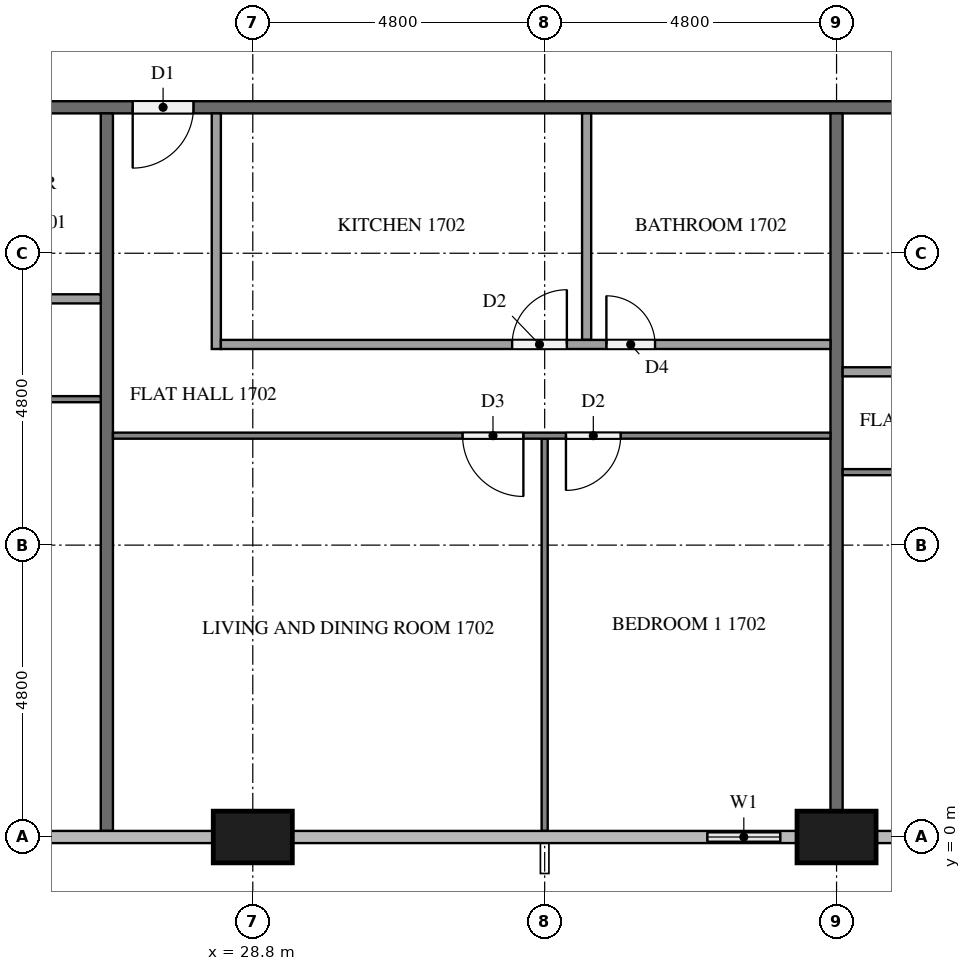
"""IFC4 building model, lengths in metres.
Left out: names, types, materials, properties, quantities, classifications, styles, units other than length and angle.
Written with IfcOpenShell. Run it as: python <this file> out.ifc"""

import sys

from ifc_helpers import new_model, si_unit, direction, frame, frame_2d, origin, origin_2d, place, context, subcontext, project, spatial, rectangle, extrude, element, fill, save


model = new_model("IFC4")
c1 = context("Model", 3, precision=1e-05, world=origin(), true_north=direction((0.0, 1.0)))
c2 = subcontext(c1, "Body", "Model", "MODEL_VIEW")
j1 = project(units=[si_unit("LENGTHUNIT", "METRE"), si_unit("PLANEANGLEUNIT", "RADIAN")], contexts=[c1])
p1 = place(None, origin())
s1 = spatial("IfcSite", under=j1, at=p1, CompositionType="ELEMENT")
p2 = place(p1, origin())
s2 = spatial("IfcBuilding", under=s1, at=p2, CompositionType="ELEMENT")
p3 = place(p2, frame((0.0, 0.0, 69.8)))
s3 = spatial("IfcBuildingStorey", under=s2, at=p3, CompositionType="ELEMENT", Elevation=69.8)
for number, where, z_axis, x_axis in (
    (1, (28.8, 0.0, 0.0), (0.0, 0.0, 1.0), (1.0, 0.0, 0.0)),
    (2, (38.4, 0.0, 0.0), (0.0, 0.0, 1.0), (1.0, 0.0, 0.0)),
):
    element("IfcColumn", number, at=place(p3, frame(where, z_axis=z_axis, x_axis=x_axis)), inside=s3, PredefinedType="COLUMN", context=c2, shape_type="SweptSolid", body=[
        extrude(rectangle(XDim=1.3, YDim=0.85, at=origin_2d()), origin(), (0.0, 0.0, 1.0), 3.2),
    ])
p4 = place(p3, frame((36.0, 0.0, 0.0), z_axis=(0.0, 0.0, 1.0), x_axis=(1.0, 0.0, 0.0)))
e3 = element("IfcWall", 3, at=p4, inside=s3, PredefinedType="SOLIDWALL", context=c2, shape_type="SweptSolid", body=[
    extrude(rectangle(XDim=1.75, YDim=0.15, at=frame_2d((0.875, 0.0))), origin(), (0.0, 0.0, 1.0), 3.2),
])
p5 = place(p4, frame((0.275, 0.0, 0.9)))
e4 = element("IfcOpeningElement", 4, at=p5, cuts=e3, PredefinedType="OPENING", context=c2, shape_type="SweptSolid", body=[
    extrude(rectangle(XDim=1.2, YDim=1.4, at=frame_2d((0.6, 0.7))), frame((0.0, 0.085, 0.0), z_axis=(0.0, -1.0, 0.0), x_axis=(1.0, 0.0, 0.0)), (0.0, 0.0, 1.0), 0.17),
])
p6 = place(p3, frame((39.05, 0.0, 0.0), z_axis=(0.0, 0.0, 1.0), x_axis=(1.0, 0.0, 0.0)))
e5 = element("IfcWall", 5, at=p6, inside=s3, PredefinedType="SOLIDWALL", context=c2, shape_type="SweptSolid", body=[
    extrude(rectangle(XDim=1.75, YDim=0.15, at=frame_2d((0.875, 0.0))), origin(), (0.0, 0.0, 1.0), 3.2),
])
p7 = place(p6, frame((0.275, 0.0, 0.9)))
e6 = element("IfcOpeningElement", 6, at=p7, cuts=e5, PredefinedType="OPENING", context=c2, shape_type="SweptSolid", body=[
    extrude(rectangle(XDim=1.2, YDim=1.4, at=frame_2d((0.6, 0.7))), frame((0.0, 0.085, 0.0), z_axis=(0.0, -1.0, 0.0), x_axis=(1.0, 0.0, 0.0)), (0.0, 0.0, 1.0), 0.17),
])
p8 = place(p3, frame((50.5, 12.0, 0.0), z_axis=(0.0, 0.0, 1.0), x_axis=(-1.0, 0.0, 0.0)))
e7 = element("IfcWall", 7, at=p8, inside=s3, PredefinedType="PARTITIONING", context=c2, shape_type="SweptSolid", body=[
    extrude(rectangle(XDim=38.6, YDim=0.2, at=frame_2d((19.3, 0.0))), origin(), (0.0, 0.0, 1.0), 3.2),
])
p9 = place(p8, frame((37.075, 0.0, 0.0)))
e8 = element("IfcOpeningElement", 8, at=p9, cuts=e7, PredefinedType="OPENING", context=c2, shape_type="SweptSolid", body=[
    extrude(rectangle(XDim=1.0, YDim=2.1, at=frame_2d((0.5, 1.05))), frame((0.0, 0.11, 0.0), z_axis=(0.0, -1.0, 0.0), x_axis=(1.0, 0.0, 0.0)), (0.0, 0.0, 1.0), 0.22),
])
p10 = place(p8, frame((22.675, 0.0, 0.0)))
e9 = element("IfcOpeningElement", 9, at=p10, cuts=e7, PredefinedType="OPENING", context=c2, shape_type="SweptSolid", body=[
    extrude(rectangle(XDim=1.0, YDim=2.1, at=frame_2d((0.5, 1.05))), frame((0.0, 0.11, 0.0), z_axis=(0.0, -1.0, 0.0), x_axis=(1.0, 0.0, 0.0)), (0.0, 0.0, 1.0), 0.22),
])
p11 = place(p8, frame((0.525, 0.0, 0.0)))
e10 = element("IfcOpeningElement", 10, at=p11, cuts=e7, PredefinedType="OPENING", context=c2, shape_type="SweptSolid", body=[
    extrude(rectangle(XDim=1.0, YDim=2.1, at=frame_2d((0.5, 1.05))), frame((0.0, 0.11, 0.0), z_axis=(0.0, -1.0, 0.0), x_axis=(1.0, 0.0, 0.0)), (0.0, 0.0, 1.0), 0.22),
])
p12 = place(p3, frame((26.4, 11.9, 0.0), z_axis=(0.0, 0.0, 1.0), x_axis=(0.0, -1.0, 0.0)))
e11 = element("IfcWall", 11, at=p12, inside=s3, PredefinedType="PARTITIONING", context=c2, shape_type="SweptSolid", body=[
    extrude(rectangle(XDim=11.8, YDim=0.2, at=frame_2d((5.9, 0.0))), origin(), (0.0, 0.0, 1.0), 3.2),
])
p13 = place(p3, frame((38.4, 11.9, 0.0), z_axis=(0.0, 0.0, 1.0), x_axis=(0.0, -1.0, 0.0)))
e12 = element("IfcWall", 12, at=p13, inside=s3, PredefinedType="PARTITIONING", context=c2, shape_type="SweptSolid", body=[
    extrude(rectangle(XDim=11.475, YDim=0.2, at=frame_2d((5.737, 0.0))), origin(), (0.0, 0.0, 1.0), 3.2),
])
p14 = place(p3, frame((26.3, 7.2, 0.0), z_axis=(0.0, 0.0, 1.0), x_axis=(-1.0, 0.0, 0.0)))
e13 = element("IfcWall", 13, at=p14, inside=s3, PredefinedType="PARTITIONING", context=c2, shape_type="SweptSolid", body=[
    extrude(rectangle(XDim=14.2, YDim=0.1, at=frame_2d((7.1, 0.0))), origin(), (0.0, 0.0, 1.0), 3.2),
])
p15 = place(p14, frame((12.9, 0.0, 0.0)))
e14 = element("IfcOpeningElement", 14, at=p15, cuts=e13, PredefinedType="OPENING", context=c2, shape_type="SweptSolid", body=[
    extrude(rectangle(XDim=1.0, YDim=2.1, at=frame_2d((0.5, 1.05))), frame((0.0, 0.06, 0.0), z_axis=(0.0, -1.0, 0.0), x_axis=(1.0, 0.0, 0.0)), (0.0, 0.0, 1.0), 0.12),
])
p16 = place(p14, frame((5.05, 0.0, 0.0)))
e15 = element("IfcOpeningElement", 15, at=p16, cuts=e13, PredefinedType="OPENING", context=c2, shape_type="SweptSolid", body=[
    extrude(rectangle(XDim=0.9, YDim=2.1, at=frame_2d((0.45, 1.05))), frame((0.0, 0.06, 0.0), z_axis=(0.0, -1.0, 0.0), x_axis=(1.0, 0.0, 0.0)), (0.0, 0.0, 1.0), 0.12),
])
p17 = place(p14, frame((3.45, 0.0, 0.0)))
e16 = element("IfcOpeningElement", 16, at=p17, cuts=e13, PredefinedType="OPENING", context=c2, shape_type="SweptSolid", body=[
    extrude(rectangle(XDim=0.9, YDim=2.1, at=frame_2d((0.45, 1.05))), frame((0.0, 0.06, 0.0), z_axis=(0.0, -1.0, 0.0), x_axis=(1.0, 0.0, 0.0)), (0.0, 0.0, 1.0), 0.12),
])
p18 = place(p3, frame((13.875, 8.85, 0.0), z_axis=(0.0, 0.0, 1.0), x_axis=(1.0, 0.0, 0.0)))
e17 = element("IfcWall", 17, at=p18, inside=s3, PredefinedType="PARTITIONING", context=c2, shape_type="SweptSolid", body=[
    extrude(rectangle(XDim=12.425, YDim=0.15, at=frame_2d((6.212, 0.0))), origin(), (0.0, 0.0, 1.0), 3.2),
])
p19 = place(p18, frame((0.3, 0.0, 0.0)))
e18 = element("IfcOpeningElement", 18, at=p19, cuts=e17, PredefinedType="OPENING", context=c2, shape_type="SweptSolid", body=[
    extrude(rectangle(XDim=0.9, YDim=2.1, at=frame_2d((0.45, 1.05))), frame((0.0, 0.085, 0.0), z_axis=(0.0, -1.0, 0.0), x_axis=(1.0, 0.0, 0.0)), (0.0, 0.0, 1.0), 0.17),
])
p20 = place(p18, frame((8.333, 0.0, 0.0)))
e19 = element("IfcOpeningElement", 19, at=p20, cuts=e17, PredefinedType="OPENING", context=c2, shape_type="SweptSolid", body=[
    extrude(rectangle(XDim=0.9, YDim=2.1, at=frame_2d((0.45, 1.05))), frame((0.0, 0.085, 0.0), z_axis=(0.0, -1.0, 0.0), x_axis=(1.0, 0.0, 0.0)), (0.0, 0.0, 1.0), 0.17),
])
p21 = place(p18, frame((9.883, 0.0, 0.0)))
e20 = element("IfcOpeningElement", 20, at=p21, cuts=e17, PredefinedType="OPENING", context=c2, shape_type="SweptSolid", body=[
    extrude(rectangle(XDim=0.8, YDim=2.1, at=frame_2d((0.4, 1.05))), frame((0.0, 0.085, 0.0), z_axis=(0.0, -1.0, 0.0), x_axis=(1.0, 0.0, 0.0)), (0.0, 0.0, 1.0), 0.17),
])
p22 = place(p3, frame((33.6, 6.55, 0.0), z_axis=(0.0, 0.0, 1.0), x_axis=(0.0, -1.0, 0.0)))
e21 = element("IfcWall", 21, at=p22, inside=s3, PredefinedType="PARTITIONING", context=c2, shape_type="SweptSolid", body=[
    extrude(rectangle(XDim=6.45, YDim=0.1, at=frame_2d((3.225, 0.0))), origin(), (0.0, 0.0, 1.0), 3.2),
])
p23 = place(p3, frame((38.3, 6.6, 0.0), z_axis=(0.0, 0.0, 1.0), x_axis=(-1.0, 0.0, 0.0)))
e22 = element("IfcWall", 22, at=p23, inside=s3, PredefinedType="PARTITIONING", context=c2, shape_type="SweptSolid", body=[
    extrude(rectangle(XDim=11.8, YDim=0.1, at=frame_2d((5.9, 0.0))), origin(), (0.0, 0.0, 1.0), 3.2),
])
p24 = place(p23, frame((5.05, 0.0, 0.0)))
e23 = element("IfcOpeningElement", 23, at=p24, cuts=e22, PredefinedType="OPENING", context=c2, shape_type="SweptSolid", body=[
    extrude(rectangle(XDim=1.0, YDim=2.1, at=frame_2d((0.5, 1.05))), frame((0.0, 0.06, 0.0), z_axis=(0.0, -1.0, 0.0), x_axis=(1.0, 0.0, 0.0)), (0.0, 0.0, 1.0), 0.12),
])
p25 = place(p23, frame((3.45, 0.0, 0.0)))
e24 = element("IfcOpeningElement", 24, at=p25, cuts=e22, PredefinedType="OPENING", context=c2, shape_type="SweptSolid", body=[
    extrude(rectangle(XDim=0.9, YDim=2.1, at=frame_2d((0.45, 1.05))), frame((0.0, 0.06, 0.0), z_axis=(0.0, -1.0, 0.0), x_axis=(1.0, 0.0, 0.0)), (0.0, 0.0, 1.0), 0.12),
])
p26 = place(p3, frame((34.29, 11.9, 0.0), z_axis=(0.0, 0.0, 1.0), x_axis=(0.0, -1.0, 0.0)))
e25 = element("IfcWall", 25, at=p26, inside=s3, PredefinedType="PARTITIONING", context=c2, shape_type="SweptSolid", body=[
    extrude(rectangle(XDim=3.725, YDim=0.15, at=frame_2d((1.862, 0.0))), origin(), (0.0, 0.0, 1.0), 3.2),
])
p27 = place(p3, frame((28.2, 11.9, 0.0), z_axis=(0.0, 0.0, 1.0), x_axis=(0.0, -1.0, 0.0)))
e26 = element("IfcWall", 26, at=p27, inside=s3, PredefinedType="PARTITIONING", context=c2, shape_type="SweptSolid", body=[
    extrude(rectangle(XDim=3.875, YDim=0.15, at=frame_2d((1.938, 0.0))), origin(), (0.0, 0.0, 1.0), 3.2),
])
p28 = place(p3, frame((28.275, 8.1, 0.0), z_axis=(0.0, 0.0, 1.0), x_axis=(1.0, 0.0, 0.0)))
e27 = element("IfcWall", 27, at=p28, inside=s3, PredefinedType="PARTITIONING", context=c2, shape_type="SweptSolid", body=[
    extrude(rectangle(XDim=10.025, YDim=0.15, at=frame_2d((5.013, 0.0))), origin(), (0.0, 0.0, 1.0), 3.2),
])
p29 = place(p28, frame((4.79, 0.0, 0.0)))
e28 = element("IfcOpeningElement", 28, at=p29, cuts=e27, PredefinedType="OPENING", context=c2, shape_type="SweptSolid", body=[
    extrude(rectangle(XDim=0.9, YDim=2.1, at=frame_2d((0.45, 1.05))), frame((0.0, 0.085, 0.0), z_axis=(0.0, -1.0, 0.0), x_axis=(1.0, 0.0, 0.0)), (0.0, 0.0, 1.0), 0.17),
])
p30 = place(p28, frame((6.34, 0.0, 0.0)))
e29 = element("IfcOpeningElement", 29, at=p30, cuts=e27, PredefinedType="OPENING", context=c2, shape_type="SweptSolid", body=[
    extrude(rectangle(XDim=0.8, YDim=2.1, at=frame_2d((0.4, 1.05))), frame((0.0, 0.085, 0.0), z_axis=(0.0, -1.0, 0.0), x_axis=(1.0, 0.0, 0.0)), (0.0, 0.0, 1.0), 0.17),
])
p31 = place(p3, frame((50.3, 6.0, 0.0), z_axis=(0.0, 0.0, 1.0), x_axis=(-1.0, 0.0, 0.0)))
e30 = element("IfcWall", 30, at=p31, inside=s3, PredefinedType="PARTITIONING", context=c2, shape_type="SweptSolid", body=[
    extrude(rectangle(XDim=11.8, YDim=0.1, at=frame_2d((5.9, 0.0))), origin(), (0.0, 0.0, 1.0), 3.2),
])
p32 = place(p31, frame((5.75, 0.0, 0.0)))
e31 = element("IfcOpeningElement", 31, at=p32, cuts=e30, PredefinedType="OPENING", context=c2, shape_type="SweptSolid", body=[
    extrude(rectangle(XDim=1.0, YDim=2.1, at=frame_2d((0.5, 1.05))), frame((0.0, 0.06, 0.0), z_axis=(0.0, -1.0, 0.0), x_axis=(1.0, 0.0, 0.0)), (0.0, 0.0, 1.0), 0.12),
])
p33 = place(p31, frame((7.45, 0.0, 0.0)))
e32 = element("IfcOpeningElement", 32, at=p33, cuts=e30, PredefinedType="OPENING", context=c2, shape_type="SweptSolid", body=[
    extrude(rectangle(XDim=0.9, YDim=2.1, at=frame_2d((0.45, 1.05))), frame((0.0, 0.06, 0.0), z_axis=(0.0, -1.0, 0.0), x_axis=(1.0, 0.0, 0.0)), (0.0, 0.0, 1.0), 0.12),
])
p34 = place(p3, frame((38.5, 7.65, 0.0), z_axis=(0.0, 0.0, 1.0), x_axis=(1.0, 0.0, 0.0)))
e33 = element("IfcWall", 33, at=p34, inside=s3, PredefinedType="PARTITIONING", context=c2, shape_type="SweptSolid", body=[
    extrude(rectangle(XDim=10.025, YDim=0.15, at=frame_2d((5.012, 0.0))), origin(), (0.0, 0.0, 1.0), 3.2),
])
p35 = place(p34, frame((6.34, 0.0, 0.0)))
e34 = element("IfcOpeningElement", 34, at=p35, cuts=e33, PredefinedType="OPENING", context=c2, shape_type="SweptSolid", body=[
    extrude(rectangle(XDim=0.8, YDim=2.1, at=frame_2d((0.4, 1.05))), frame((0.0, 0.085, 0.0), z_axis=(0.0, -1.0, 0.0), x_axis=(1.0, 0.0, 0.0)), (0.0, 0.0, 1.0), 0.17),
])
p36 = place(p34, frame((4.79, 0.0, 0.0)))
e35 = element("IfcOpeningElement", 35, at=p36, cuts=e33, PredefinedType="OPENING", context=c2, shape_type="SweptSolid", body=[
    extrude(rectangle(XDim=0.9, YDim=2.1, at=frame_2d((0.45, 1.05))), frame((0.0, 0.085, 0.0), z_axis=(0.0, -1.0, 0.0), x_axis=(1.0, 0.0, 0.0)), (0.0, 0.0, 1.0), 0.17),
])
p37 = place(p5, origin())
e36 = element("IfcWindow", 36, at=p37, inside=s3, PartitioningType="SINGLE_PANEL", PredefinedType="WINDOW", context=c2, shape_type="SweptSolid", body=[
    extrude(rectangle(XDim=1.2, YDim=1.4, at=frame_2d((0.6, 0.7))), frame((0.0, 0.03, 0.0), z_axis=(0.0, -1.0, 0.0), x_axis=(1.0, 0.0, 0.0)), (0.0, 0.0, 1.0), 0.06),
])
fill(e4, e36)
p38 = place(p10, origin())
e37 = element("IfcDoor", 37, at=p38, inside=s3, OperationType="SINGLE_SWING_RIGHT", PredefinedType="DOOR", context=c2, shape_type="SweptSolid", body=[
    extrude(rectangle(XDim=1.0, YDim=2.1, at=frame_2d((0.5, 1.05))), frame((0.0, 0.025, 0.0), z_axis=(0.0, -1.0, 0.0), x_axis=(1.0, 0.0, 0.0)), (0.0, 0.0, 1.0), 0.05),
])
fill(e9, e37)
p39 = place(p24, origin())
e38 = element("IfcDoor", 38, at=p39, inside=s3, OperationType="SINGLE_SWING_LEFT", PredefinedType="DOOR", context=c2, shape_type="SweptSolid", body=[
    extrude(rectangle(XDim=1.0, YDim=2.1, at=frame_2d((0.5, 1.05))), frame((0.0, 0.025, 0.0), z_axis=(0.0, -1.0, 0.0), x_axis=(1.0, 0.0, 0.0)), (0.0, 0.0, 1.0), 0.05),
])
fill(e23, e38)
p40 = place(p25, origin())
e39 = element("IfcDoor", 39, at=p40, inside=s3, OperationType="SINGLE_SWING_RIGHT", PredefinedType="DOOR", context=c2, shape_type="SweptSolid", body=[
    extrude(rectangle(XDim=0.9, YDim=2.1, at=frame_2d((0.45, 1.05))), frame((0.0, 0.025, 0.0), z_axis=(0.0, -1.0, 0.0), x_axis=(1.0, 0.0, 0.0)), (0.0, 0.0, 1.0), 0.05),
])
fill(e24, e39)
p41 = place(p29, origin())
e40 = element("IfcDoor", 40, at=p41, inside=s3, OperationType="SINGLE_SWING_RIGHT", PredefinedType="DOOR", context=c2, shape_type="SweptSolid", body=[
    extrude(rectangle(XDim=0.9, YDim=2.1, at=frame_2d((0.45, 1.05))), frame((0.0, 0.025, 0.0), z_axis=(0.0, -1.0, 0.0), x_axis=(1.0, 0.0, 0.0)), (0.0, 0.0, 1.0), 0.05),
])
fill(e28, e40)
p42 = place(p30, origin())
e41 = element("IfcDoor", 41, at=p42, inside=s3, OperationType="SINGLE_SWING_LEFT", PredefinedType="DOOR", context=c2, shape_type="SweptSolid", body=[
    extrude(rectangle(XDim=0.8, YDim=2.1, at=frame_2d((0.4, 1.05))), frame((0.0, 0.025, 0.0), z_axis=(0.0, -1.0, 0.0), x_axis=(1.0, 0.0, 0.0)), (0.0, 0.0, 1.0), 0.05),
])
fill(e29, e41)
save(model, sys.argv[1])
